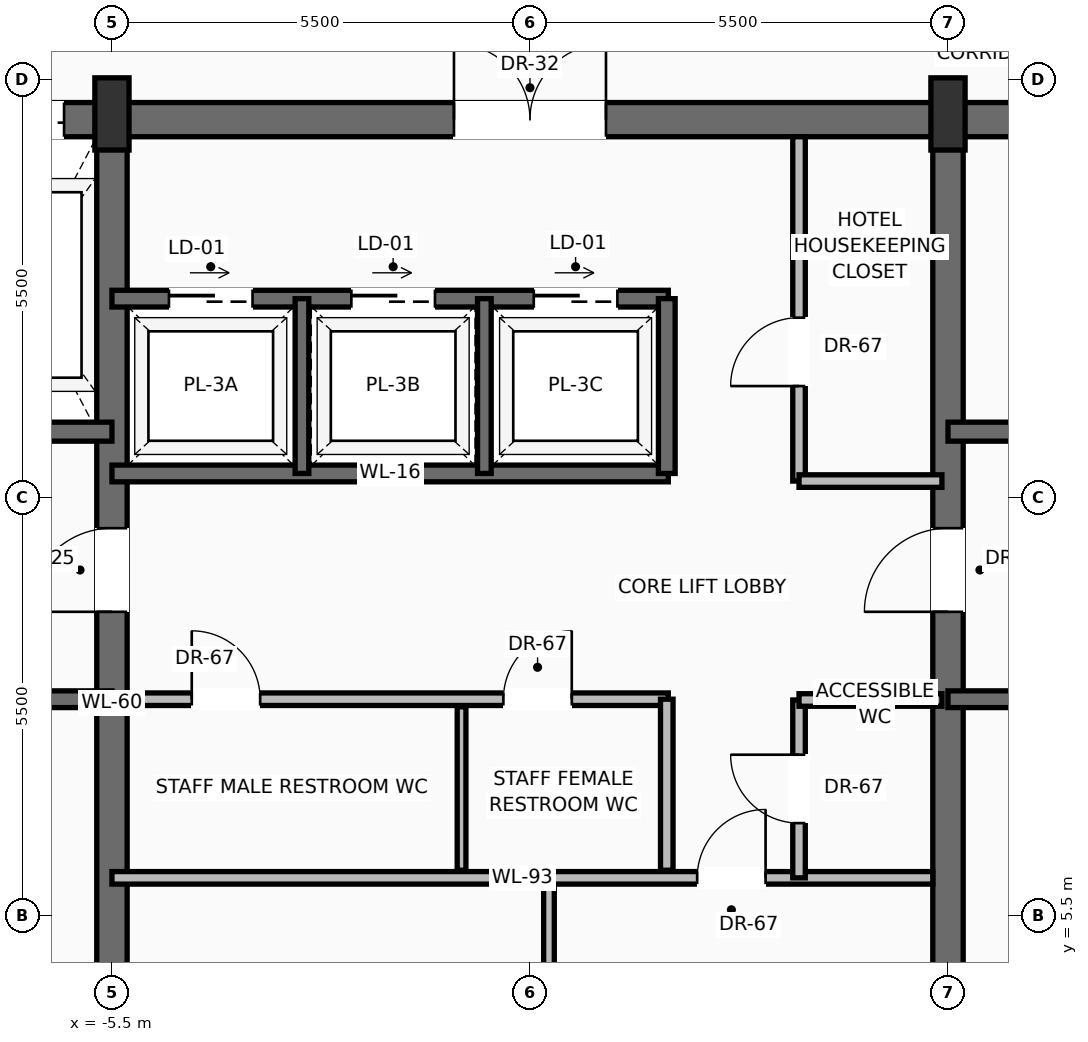
"""IFC4 building model, lengths in metres.
Left out: names, types, materials, properties, quantities, classifications, styles, units other than length and angle.
Written with IfcOpenShell. Run it as: python <this file> out.ifc"""

import sys

from ifc_helpers import new_model, si_unit, direction, frame, frame_2d, origin, origin_2d, place, context, subcontext, project, spatial, rectangle, extrude, source, transform, mapped, element, fill, save


model = new_model("IFC4")
c1 = context("Model", 3, precision=1e-05, world=origin(), true_north=direction((0.0, 1.0)))
c2 = subcontext(c1, "Body", "Model", "MODEL_VIEW")
j1 = project(units=[si_unit("LENGTHUNIT", "METRE"), si_unit("PLANEANGLEUNIT", "RADIAN")], contexts=[c1])
p1 = place(None, origin())
s1 = spatial("IfcSite", under=j1, at=p1, CompositionType="ELEMENT")
p2 = place(p1, origin())
s2 = spatial("IfcBuilding", under=s1, at=p2, CompositionType="ELEMENT")
p3 = place(p2, frame((0.0, 0.0, 286.8)))
s3 = spatial("IfcBuildingStorey", under=s2, at=p3, CompositionType="ELEMENT", Elevation=286.8)
p4 = place(p3, frame((-10.6, 15.975, 0.0), z_axis=(0.0, 0.0, 1.0), x_axis=(1.0, 0.0, 0.0)))
e1 = element("IfcWall", 1, at=p4, inside=s3, PredefinedType="SHEAR", context=c2, shape_type="SweptSolid", body=[
    extrude(rectangle(XDim=21.2, YDim=0.45, at=frame_2d((10.6, 0.0))), origin(), (0.0, 0.0, 1.0), 3.24),
])
p5 = place(p4, frame((3.17, 0.0, 0.0)))
e2 = element("IfcOpeningElement", 2, at=p5, cuts=e1, PredefinedType="OPENING", context=c2, shape_type="SweptSolid", body=[
    extrude(rectangle(XDim=1.3, YDim=2.3, at=frame_2d((0.65, 1.15))), frame((0.0, 0.235, 0.0), z_axis=(0.0, -1.0, 0.0), x_axis=(1.0, 0.0, 0.0)), (0.0, 0.0, 1.0), 0.47),
])
p6 = place(p4, frame((9.6, 0.0, 0.0)))
e3 = element("IfcOpeningElement", 3, at=p6, cuts=e1, PredefinedType="OPENING", context=c2, shape_type="SweptSolid", body=[
    extrude(rectangle(XDim=2.0, YDim=2.4, at=frame_2d((1.0, 1.2))), frame((0.0, 0.235, 0.0), z_axis=(0.0, -1.0, 0.0), x_axis=(1.0, 0.0, 0.0)), (0.0, 0.0, 1.0), 0.47),
])
p7 = place(p3, frame((-5.5, 0.625, 0.0), z_axis=(0.0, 0.0, 1.0), x_axis=(0.0, 1.0, 0.0)))
e4 = element("IfcWall", 4, at=p7, inside=s3, PredefinedType="SHEAR", context=c2, shape_type="SweptSolid", body=[
    extrude(rectangle(XDim=15.35, YDim=0.4, at=frame_2d((7.675, 0.0))), origin(), (0.0, 0.0, 1.0), 3.24),
])
p8 = place(p7, frame((8.875, 0.0, 0.0)))
e5 = element("IfcOpeningElement", 5, at=p8, cuts=e4, PredefinedType="OPENING", context=c2, shape_type="SweptSolid", body=[
    extrude(rectangle(XDim=1.1, YDim=2.2, at=frame_2d((0.55, 1.1))), frame((0.0, 0.21, 0.0), z_axis=(0.0, -1.0, 0.0), x_axis=(1.0, 0.0, 0.0)), (0.0, 0.0, 1.0), 0.42),
])
p9 = place(p3, frame((5.5, 0.625, 0.0), z_axis=(0.0, 0.0, 1.0), x_axis=(0.0, 1.0, 0.0)))
e6 = element("IfcWall", 6, at=p9, inside=s3, PredefinedType="SHEAR", context=c2, shape_type="SweptSolid", body=[
    extrude(rectangle(XDim=15.35, YDim=0.4, at=frame_2d((7.675, 0.0))), origin(), (0.0, 0.0, 1.0), 3.24),
])
p10 = place(p9, frame((8.875, 0.0, 0.0)))
e7 = element("IfcOpeningElement", 7, at=p10, cuts=e6, PredefinedType="OPENING", context=c2, shape_type="SweptSolid", body=[
    extrude(rectangle(XDim=1.1, YDim=2.2, at=frame_2d((0.55, 1.1))), frame((0.0, 0.21, 0.0), z_axis=(0.0, -1.0, 0.0), x_axis=(1.0, 0.0, 0.0)), (0.0, 0.0, 1.0), 0.42),
])
m1 = source(origin(), c2, "Body", "SweptSolid", [
    extrude(rectangle(XDim=0.45, YDim=0.95, at=origin_2d()), origin(), (0.0, 0.0, 1.0), 3.45),
])
for number, where, z_axis, x_axis in (
    (8, (-5.5, 16.05, 0.0), (0.0, 0.0, 1.0), (1.0, 0.0, 0.0)),
    (9, (5.5, 16.05, 0.0), (0.0, 0.0, 1.0), (1.0, 0.0, 0.0)),
):
    element("IfcColumn", number, at=place(p3, frame(where, z_axis=z_axis, x_axis=x_axis)), inside=s3, PredefinedType="PILASTER", context=c2, shape_type="MappedRepresentation", body=[
        mapped(m1, transform((0.0, 0.0, 0.0), scale=1.0)),
    ])
p11 = place(p3, frame((-5.5, 8.35, 0.0), z_axis=(0.0, 0.0, 1.0), x_axis=(-1.0, 0.0, 0.0)))
e10 = element("IfcWall", 10, at=p11, inside=s3, PredefinedType="SOLIDWALL", context=c2, shape_type="SweptSolid", body=[
    extrude(rectangle(XDim=4.65, YDim=0.22, at=frame_2d((2.325, 0.0))), origin(), (0.0, 0.0, 1.0), 3.24),
])
p12 = place(p11, frame((2.5, 0.0, 0.0)))
e11 = element("IfcOpeningElement", 11, at=p12, cuts=e10, PredefinedType="OPENING", context=c2, shape_type="SweptSolid", body=[
    extrude(rectangle(XDim=1.15, YDim=2.2, at=frame_2d((0.575, 1.1))), frame((0.0, 0.12, 0.0), z_axis=(0.0, -1.0, 0.0), x_axis=(1.0, 0.0, 0.0)), (0.0, 0.0, 1.0), 0.24),
])
p13 = place(p3, frame((-5.5, 11.87, 0.0), z_axis=(0.0, 0.0, 1.0), x_axis=(-1.0, 0.0, 0.0)))
e12 = element("IfcWall", 12, at=p13, inside=s3, PredefinedType="SOLIDWALL", context=c2, shape_type="SweptSolid", body=[
    extrude(rectangle(XDim=4.65, YDim=0.25, at=frame_2d((2.325, 0.0))), origin(), (0.0, 0.0, 1.0), 3.24),
])
p14 = place(p13, frame((2.95, 0.0, 0.0)))
e13 = element("IfcOpeningElement", 13, at=p14, cuts=e12, PredefinedType="OPENING", context=c2, shape_type="SweptSolid", body=[
    extrude(rectangle(XDim=1.2, YDim=2.25, at=frame_2d((0.6, 1.125))), frame((0.0, 0.135, 0.0), z_axis=(0.0, -1.0, 0.0), x_axis=(1.0, 0.0, 0.0)), (0.0, 0.0, 1.0), 0.27),
])
p15 = place(p3, frame((10.15, 8.35, 0.0), z_axis=(0.0, 0.0, 1.0), x_axis=(-1.0, 0.0, 0.0)))
e14 = element("IfcWall", 14, at=p15, inside=s3, PredefinedType="SOLIDWALL", context=c2, shape_type="SweptSolid", body=[
    extrude(rectangle(XDim=4.65, YDim=0.22, at=frame_2d((2.325, 0.0))), origin(), (0.0, 0.0, 1.0), 3.24),
])
p16 = place(p15, frame((1.0, 0.0, 0.0)))
e15 = element("IfcOpeningElement", 15, at=p16, cuts=e14, PredefinedType="OPENING", context=c2, shape_type="SweptSolid", body=[
    extrude(rectangle(XDim=1.15, YDim=2.2, at=frame_2d((0.575, 1.1))), frame((0.0, 0.12, 0.0), z_axis=(0.0, -1.0, 0.0), x_axis=(1.0, 0.0, 0.0)), (0.0, 0.0, 1.0), 0.24),
])
p17 = place(p3, frame((10.15, 11.87, 0.0), z_axis=(0.0, 0.0, 1.0), x_axis=(-1.0, 0.0, 0.0)))
e16 = element("IfcWall", 16, at=p17, inside=s3, PredefinedType="SOLIDWALL", context=c2, shape_type="SweptSolid", body=[
    extrude(rectangle(XDim=4.65, YDim=0.25, at=frame_2d((2.325, 0.0))), origin(), (0.0, 0.0, 1.0), 3.24),
])
p18 = place(p17, frame((0.5, 0.0, 0.0)))
e17 = element("IfcOpeningElement", 17, at=p18, cuts=e16, PredefinedType="OPENING", context=c2, shape_type="SweptSolid", body=[
    extrude(rectangle(XDim=1.2, YDim=2.25, at=frame_2d((0.6, 1.125))), frame((0.0, 0.135, 0.0), z_axis=(0.0, -1.0, 0.0), x_axis=(1.0, 0.0, 0.0)), (0.0, 0.0, 1.0), 0.27),
])
p19 = place(p3, frame((-5.5, 6.0, 0.0), z_axis=(0.0, 0.0, 1.0), x_axis=(1.0, 0.0, 0.0)))
e18 = element("IfcWall", 18, at=p19, inside=s3, PredefinedType="PARTITIONING", context=c2, shape_type="SweptSolid", body=[
    extrude(rectangle(XDim=10.8, YDim=0.165, at=frame_2d((5.4, 0.0))), origin(), (0.0, 0.0, 1.0), 3.232),
])
p20 = place(p19, frame((7.7, 0.0, 0.0)))
e19 = element("IfcOpeningElement", 19, at=p20, cuts=e18, PredefinedType="OPENING", context=c2, shape_type="SweptSolid", body=[
    extrude(rectangle(XDim=0.9, YDim=2.1, at=frame_2d((0.45, 1.05))), frame((0.0, 0.093, 0.0), z_axis=(0.0, -1.0, 0.0), x_axis=(1.0, 0.0, 0.0)), (0.0, 0.0, 1.0), 0.185),
])
p21 = place(p3, frame((0.25, 0.85, 0.0), z_axis=(0.0, 0.0, 1.0), x_axis=(0.0, 1.0, 0.0)))
e20 = element("IfcWall", 20, at=p21, inside=s3, PredefinedType="PARTITIONING", context=c2, shape_type="SweptSolid", body=[
    extrude(rectangle(XDim=5.03, YDim=0.14, at=frame_2d((2.515, 0.0))), origin(), (0.0, 0.0, 1.0), 3.232),
])
p22 = place(p21, frame((2.1, 0.0, 0.0)))
e21 = element("IfcOpeningElement", 21, at=p22, cuts=e20, PredefinedType="OPENING", context=c2, shape_type="SweptSolid", body=[
    extrude(rectangle(XDim=0.9, YDim=2.1, at=frame_2d((0.45, 1.05))), frame((0.0, 0.08, 0.0), z_axis=(0.0, -1.0, 0.0), x_axis=(1.0, 0.0, 0.0)), (0.0, 0.0, 1.0), 0.16),
])
p23 = place(p3, frame((3.54, 6.0, 0.0), z_axis=(0.0, 0.0, 1.0), x_axis=(0.0, 1.0, 0.0)))
e22 = element("IfcWall", 22, at=p23, inside=s3, PredefinedType="PARTITIONING", context=c2, shape_type="SweptSolid", body=[
    extrude(rectangle(XDim=2.34, YDim=0.165, at=frame_2d((1.17, 0.0))), origin(), (0.0, 0.0, 1.0), 3.232),
])
p24 = place(p23, frame((0.72, 0.0, 0.0)))
e23 = element("IfcOpeningElement", 23, at=p24, cuts=e22, PredefinedType="OPENING", context=c2, shape_type="SweptSolid", body=[
    extrude(rectangle(XDim=0.9, YDim=2.1, at=frame_2d((0.45, 1.05))), frame((0.0, 0.093, 0.0), z_axis=(0.0, -1.0, 0.0), x_axis=(1.0, 0.0, 0.0)), (0.0, 0.0, 1.0), 0.185),
])
p25 = place(p3, frame((3.54, 8.34, 0.0), z_axis=(0.0, 0.0, 1.0), x_axis=(1.0, 0.0, 0.0)))
e24 = element("IfcWall", 24, at=p25, inside=s3, PredefinedType="PARTITIONING", context=c2, shape_type="SweptSolid", body=[
    extrude(rectangle(XDim=1.88, YDim=0.165, at=frame_2d((0.94, 0.0))), origin(), (0.0, 0.0, 1.0), 3.232),
])
p26 = place(p3, frame((-5.3, 8.35, 0.0), z_axis=(0.0, 0.0, 1.0), x_axis=(1.0, 0.0, 0.0)))
e25 = element("IfcWall", 25, at=p26, inside=s3, PredefinedType="PARTITIONING", context=c2, shape_type="SweptSolid", body=[
    extrude(rectangle(XDim=7.12, YDim=0.165, at=frame_2d((3.56, 0.0))), origin(), (0.0, 0.0, 1.0), 3.232),
])
p27 = place(p26, frame((0.85, 0.0, 0.0)))
e26 = element("IfcOpeningElement", 26, at=p27, cuts=e25, PredefinedType="OPENING", context=c2, shape_type="SweptSolid", body=[
    extrude(rectangle(XDim=0.9, YDim=2.1, at=frame_2d((0.45, 1.05))), frame((0.0, 0.093, 0.0), z_axis=(0.0, -1.0, 0.0), x_axis=(1.0, 0.0, 0.0)), (0.0, 0.0, 1.0), 0.185),
])
p28 = place(p26, frame((4.95, 0.0, 0.0)))
e27 = element("IfcOpeningElement", 27, at=p28, cuts=e25, PredefinedType="OPENING", context=c2, shape_type="SweptSolid", body=[
    extrude(rectangle(XDim=0.9, YDim=2.1, at=frame_2d((0.45, 1.05))), frame((0.0, 0.093, 0.0), z_axis=(0.0, -1.0, 0.0), x_axis=(1.0, 0.0, 0.0)), (0.0, 0.0, 1.0), 0.185),
])
p29 = place(p3, frame((1.8, 6.1, 0.0), z_axis=(0.0, 0.0, 1.0), x_axis=(0.0, 1.0, 0.0)))
e28 = element("IfcWall", 28, at=p29, inside=s3, PredefinedType="PARTITIONING", context=c2, shape_type="SweptSolid", body=[
    extrude(rectangle(XDim=2.25, YDim=0.165, at=frame_2d((1.125, 0.0))), origin(), (0.0, 0.0, 1.0), 3.232),
])
p30 = place(p3, frame((-0.9, 6.1, 0.0), z_axis=(0.0, 0.0, 1.0), x_axis=(0.0, 1.0, 0.0)))
e29 = element("IfcWall", 29, at=p30, inside=s3, PredefinedType="PARTITIONING", context=c2, shape_type="SweptSolid", body=[
    extrude(rectangle(XDim=2.15, YDim=0.115, at=frame_2d((1.075, 0.0))), origin(), (0.0, 0.0, 1.0), 3.232),
])
p31 = place(p3, frame((-5.5, 11.32, 0.0), z_axis=(0.0, 0.0, 1.0), x_axis=(1.0, 0.0, 0.0)))
e30 = element("IfcWall", 30, at=p31, inside=s3, PredefinedType="SOLIDWALL", context=c2, shape_type="SweptSolid", body=[
    extrude(rectangle(XDim=7.32, YDim=0.22, at=frame_2d((3.66, 0.0))), origin(), (0.0, 0.0, 1.0), 3.24),
])
p32 = place(p3, frame((-5.5, 13.62, 0.0), z_axis=(0.0, 0.0, 1.0), x_axis=(1.0, 0.0, 0.0)))
e31 = element("IfcWall", 31, at=p32, inside=s3, PredefinedType="SOLIDWALL", context=c2, shape_type="SweptSolid", body=[
    extrude(rectangle(XDim=7.32, YDim=0.22, at=frame_2d((3.66, 0.0))), origin(), (0.0, 0.0, 1.0), 3.24),
])
p33 = place(p32, frame((0.75, 0.0, 0.0)))
e32 = element("IfcOpeningElement", 32, at=p33, cuts=e31, PredefinedType="OPENING", context=c2, shape_type="SweptSolid", body=[
    extrude(rectangle(XDim=1.1, YDim=2.2, at=frame_2d((0.55, 1.1))), frame((0.0, 0.12, 0.0), z_axis=(0.0, -1.0, 0.0), x_axis=(1.0, 0.0, 0.0)), (0.0, 0.0, 1.0), 0.24),
])
p34 = place(p32, frame((3.15, 0.0, 0.0)))
e33 = element("IfcOpeningElement", 33, at=p34, cuts=e31, PredefinedType="OPENING", context=c2, shape_type="SweptSolid", body=[
    extrude(rectangle(XDim=1.1, YDim=2.2, at=frame_2d((0.55, 1.1))), frame((0.0, 0.12, 0.0), z_axis=(0.0, -1.0, 0.0), x_axis=(1.0, 0.0, 0.0)), (0.0, 0.0, 1.0), 0.24),
])
p35 = place(p32, frame((5.55, 0.0, 0.0)))
e34 = element("IfcOpeningElement", 34, at=p35, cuts=e31, PredefinedType="OPENING", context=c2, shape_type="SweptSolid", body=[
    extrude(rectangle(XDim=1.1, YDim=2.2, at=frame_2d((0.55, 1.1))), frame((0.0, 0.12, 0.0), z_axis=(0.0, -1.0, 0.0), x_axis=(1.0, 0.0, 0.0)), (0.0, 0.0, 1.0), 0.24),
])
p36 = place(p3, frame((1.8, 11.32, 0.0), z_axis=(0.0, 0.0, 1.0), x_axis=(0.0, 1.0, 0.0)))
e35 = element("IfcWall", 35, at=p36, inside=s3, PredefinedType="SOLIDWALL", context=c2, shape_type="SweptSolid", body=[
    extrude(rectangle(XDim=2.3, YDim=0.22, at=frame_2d((1.15, 0.0))), origin(), (0.0, 0.0, 1.0), 3.24),
])
for number, where, z_axis, x_axis in (
    (36, (-3.0, 11.32, 0.0), (0.0, 0.0, 1.0), (0.0, 1.0, 0.0)),
    (37, (-0.6, 11.32, 0.0), (0.0, 0.0, 1.0), (0.0, 1.0, 0.0)),
):
    element("IfcWall", number, at=place(p3, frame(where, z_axis=z_axis, x_axis=x_axis)), inside=s3, PredefinedType="SOLIDWALL", context=c2, shape_type="SweptSolid", body=[
        extrude(rectangle(XDim=2.3, YDim=0.18, at=frame_2d((1.15, 0.0))), origin(), (0.0, 0.0, 1.0), 3.24),
    ])
p37 = place(p3, frame((3.54, 11.22, 0.0), z_axis=(0.0, 0.0, 1.0), x_axis=(0.0, 1.0, 0.0)))
e38 = element("IfcWall", 38, at=p37, inside=s3, PredefinedType="PARTITIONING", context=c2, shape_type="SweptSolid", body=[
    extrude(rectangle(XDim=4.53, YDim=0.165, at=frame_2d((2.265, 0.0))), origin(), (0.0, 0.0, 1.0), 3.232),
])
p38 = place(p37, frame((1.25, 0.0, 0.0)))
e39 = element("IfcOpeningElement", 39, at=p38, cuts=e38, PredefinedType="OPENING", context=c2, shape_type="SweptSolid", body=[
    extrude(rectangle(XDim=0.9, YDim=2.1, at=frame_2d((0.45, 1.05))), frame((0.0, 0.093, 0.0), z_axis=(0.0, -1.0, 0.0), x_axis=(1.0, 0.0, 0.0)), (0.0, 0.0, 1.0), 0.185),
])
p39 = place(p3, frame((3.54, 11.22, 0.0), z_axis=(0.0, 0.0, 1.0), x_axis=(1.0, 0.0, 0.0)))
e40 = element("IfcWall", 40, at=p39, inside=s3, PredefinedType="PARTITIONING", context=c2, shape_type="SweptSolid", body=[
    extrude(rectangle(XDim=1.88, YDim=0.165, at=frame_2d((0.94, 0.0))), origin(), (0.0, 0.0, 1.0), 3.232),
])
m2 = source(origin(), c2, "Body", "SweptSolid", [
    extrude(rectangle(XDim=1.1, YDim=2.2, at=frame_2d((0.55, 1.1))), frame((0.0, 0.025, 0.0), z_axis=(0.0, -1.0, 0.0), x_axis=(1.0, 0.0, 0.0)), (0.0, 0.0, 1.0), 0.05),
])
p40 = place(p8, origin())
e41 = element("IfcDoor", 41, at=p40, inside=s3, OperationType="SINGLE_SWING_LEFT", PredefinedType="DOOR", context=c2, shape_type="MappedRepresentation", body=[
    mapped(m2, transform((0.0, 0.0, 0.0), scale=1.0)),
])
fill(e5, e41)
m3 = source(origin(), c2, "Body", "SweptSolid", [
    extrude(rectangle(XDim=1.3, YDim=2.3, at=frame_2d((0.65, 1.15))), frame((0.0, 0.025, 0.0), z_axis=(0.0, -1.0, 0.0), x_axis=(1.0, 0.0, 0.0)), (0.0, 0.0, 1.0), 0.05),
])
p41 = place(p5, origin())
e42 = element("IfcDoor", 42, at=p41, inside=s3, OperationType="SLIDING_TO_RIGHT", PredefinedType="DOOR", context=c2, shape_type="MappedRepresentation", body=[
    mapped(m3, transform((0.0, 0.0, 0.0), scale=1.0)),
])
fill(e2, e42)
p42 = place(p10, origin())
e43 = element("IfcDoor", 43, at=p42, inside=s3, OperationType="SINGLE_SWING_LEFT", PredefinedType="DOOR", context=c2, shape_type="MappedRepresentation", body=[
    mapped(m2, transform((0.0, 0.0, 0.0), scale=1.0)),
])
fill(e7, e43)
m4 = source(origin(), c2, "Body", "SweptSolid", [
    extrude(rectangle(XDim=2.0, YDim=2.4, at=frame_2d((1.0, 1.2))), frame((0.0, 0.025, 0.0), z_axis=(0.0, -1.0, 0.0), x_axis=(1.0, 0.0, 0.0)), (0.0, 0.0, 1.0), 0.05),
])
p43 = place(p6, origin())
e44 = element("IfcDoor", 44, at=p43, inside=s3, OperationType="DOUBLE_DOOR_SINGLE_SWING", PredefinedType="DOOR", context=c2, shape_type="MappedRepresentation", body=[
    mapped(m4, transform((0.0, 0.0, 0.0), scale=1.0)),
])
fill(e3, e44)
m5 = source(origin(), c2, "Body", "SweptSolid", [
    extrude(rectangle(XDim=0.9, YDim=2.1, at=frame_2d((0.45, 1.05))), frame((0.0, 0.025, 0.0), z_axis=(0.0, -1.0, 0.0), x_axis=(1.0, 0.0, 0.0)), (0.0, 0.0, 1.0), 0.05),
])
p44 = place(p20, origin())
e45 = element("IfcDoor", 45, at=p44, inside=s3, OperationType="SINGLE_SWING_RIGHT", PredefinedType="DOOR", context=c2, shape_type="MappedRepresentation", body=[
    mapped(m5, transform((0.0, 0.0, 0.0), scale=1.0)),
])
fill(e19, e45)
p45 = place(p24, origin())
e46 = element("IfcDoor", 46, at=p45, inside=s3, OperationType="SINGLE_SWING_RIGHT", PredefinedType="DOOR", context=c2, shape_type="MappedRepresentation", body=[
    mapped(m5, transform((0.0, 0.0, 0.0), scale=1.0)),
])
fill(e23, e46)
p46 = place(p27, origin())
e47 = element("IfcDoor", 47, at=p46, inside=s3, OperationType="SINGLE_SWING_LEFT", PredefinedType="DOOR", context=c2, shape_type="MappedRepresentation", body=[
    mapped(m5, transform((0.0, 0.0, 0.0), scale=1.0)),
])
fill(e26, e47)
p47 = place(p28, origin())
e48 = element("IfcDoor", 48, at=p47, inside=s3, OperationType="SINGLE_SWING_RIGHT", PredefinedType="DOOR", context=c2, shape_type="MappedRepresentation", body=[
    mapped(m5, transform((0.0, 0.0, 0.0), scale=1.0)),
])
fill(e27, e48)
m6 = source(origin(), c2, "Body", "SweptSolid", [
    extrude(rectangle(XDim=1.1, YDim=2.2, at=frame_2d((0.55, 1.1))), frame((0.0, 0.025, 0.0), z_axis=(0.0, -1.0, 0.0), x_axis=(1.0, 0.0, 0.0)), (0.0, 0.0, 1.0), 0.05),
])
p48 = place(p33, origin())
e49 = element("IfcDoor", 49, at=p48, inside=s3, OperationType="SLIDING_TO_RIGHT", PredefinedType="DOOR", context=c2, shape_type="MappedRepresentation", body=[
    mapped(m6, transform((0.0, 0.0, 0.0), scale=1.0)),
])
fill(e32, e49)
p49 = place(p34, origin())
e50 = element("IfcDoor", 50, at=p49, inside=s3, OperationType="SLIDING_TO_RIGHT", PredefinedType="DOOR", context=c2, shape_type="MappedRepresentation", body=[
    mapped(m6, transform((0.0, 0.0, 0.0), scale=1.0)),
])
fill(e33, e50)
p50 = place(p35, origin())
e51 = element("IfcDoor", 51, at=p50, inside=s3, OperationType="SLIDING_TO_RIGHT", PredefinedType="DOOR", context=c2, shape_type="MappedRepresentation", body=[
    mapped(m6, transform((0.0, 0.0, 0.0), scale=1.0)),
])
fill(e34, e51)
p51 = place(p38, origin())
e52 = element("IfcDoor", 52, at=p51, inside=s3, OperationType="SINGLE_SWING_LEFT", PredefinedType="DOOR", context=c2, shape_type="MappedRepresentation", body=[
    mapped(m5, transform((0.0, 0.0, 0.0), scale=1.0)),
])
fill(e39, e52)
save(model, sys.argv[1])
